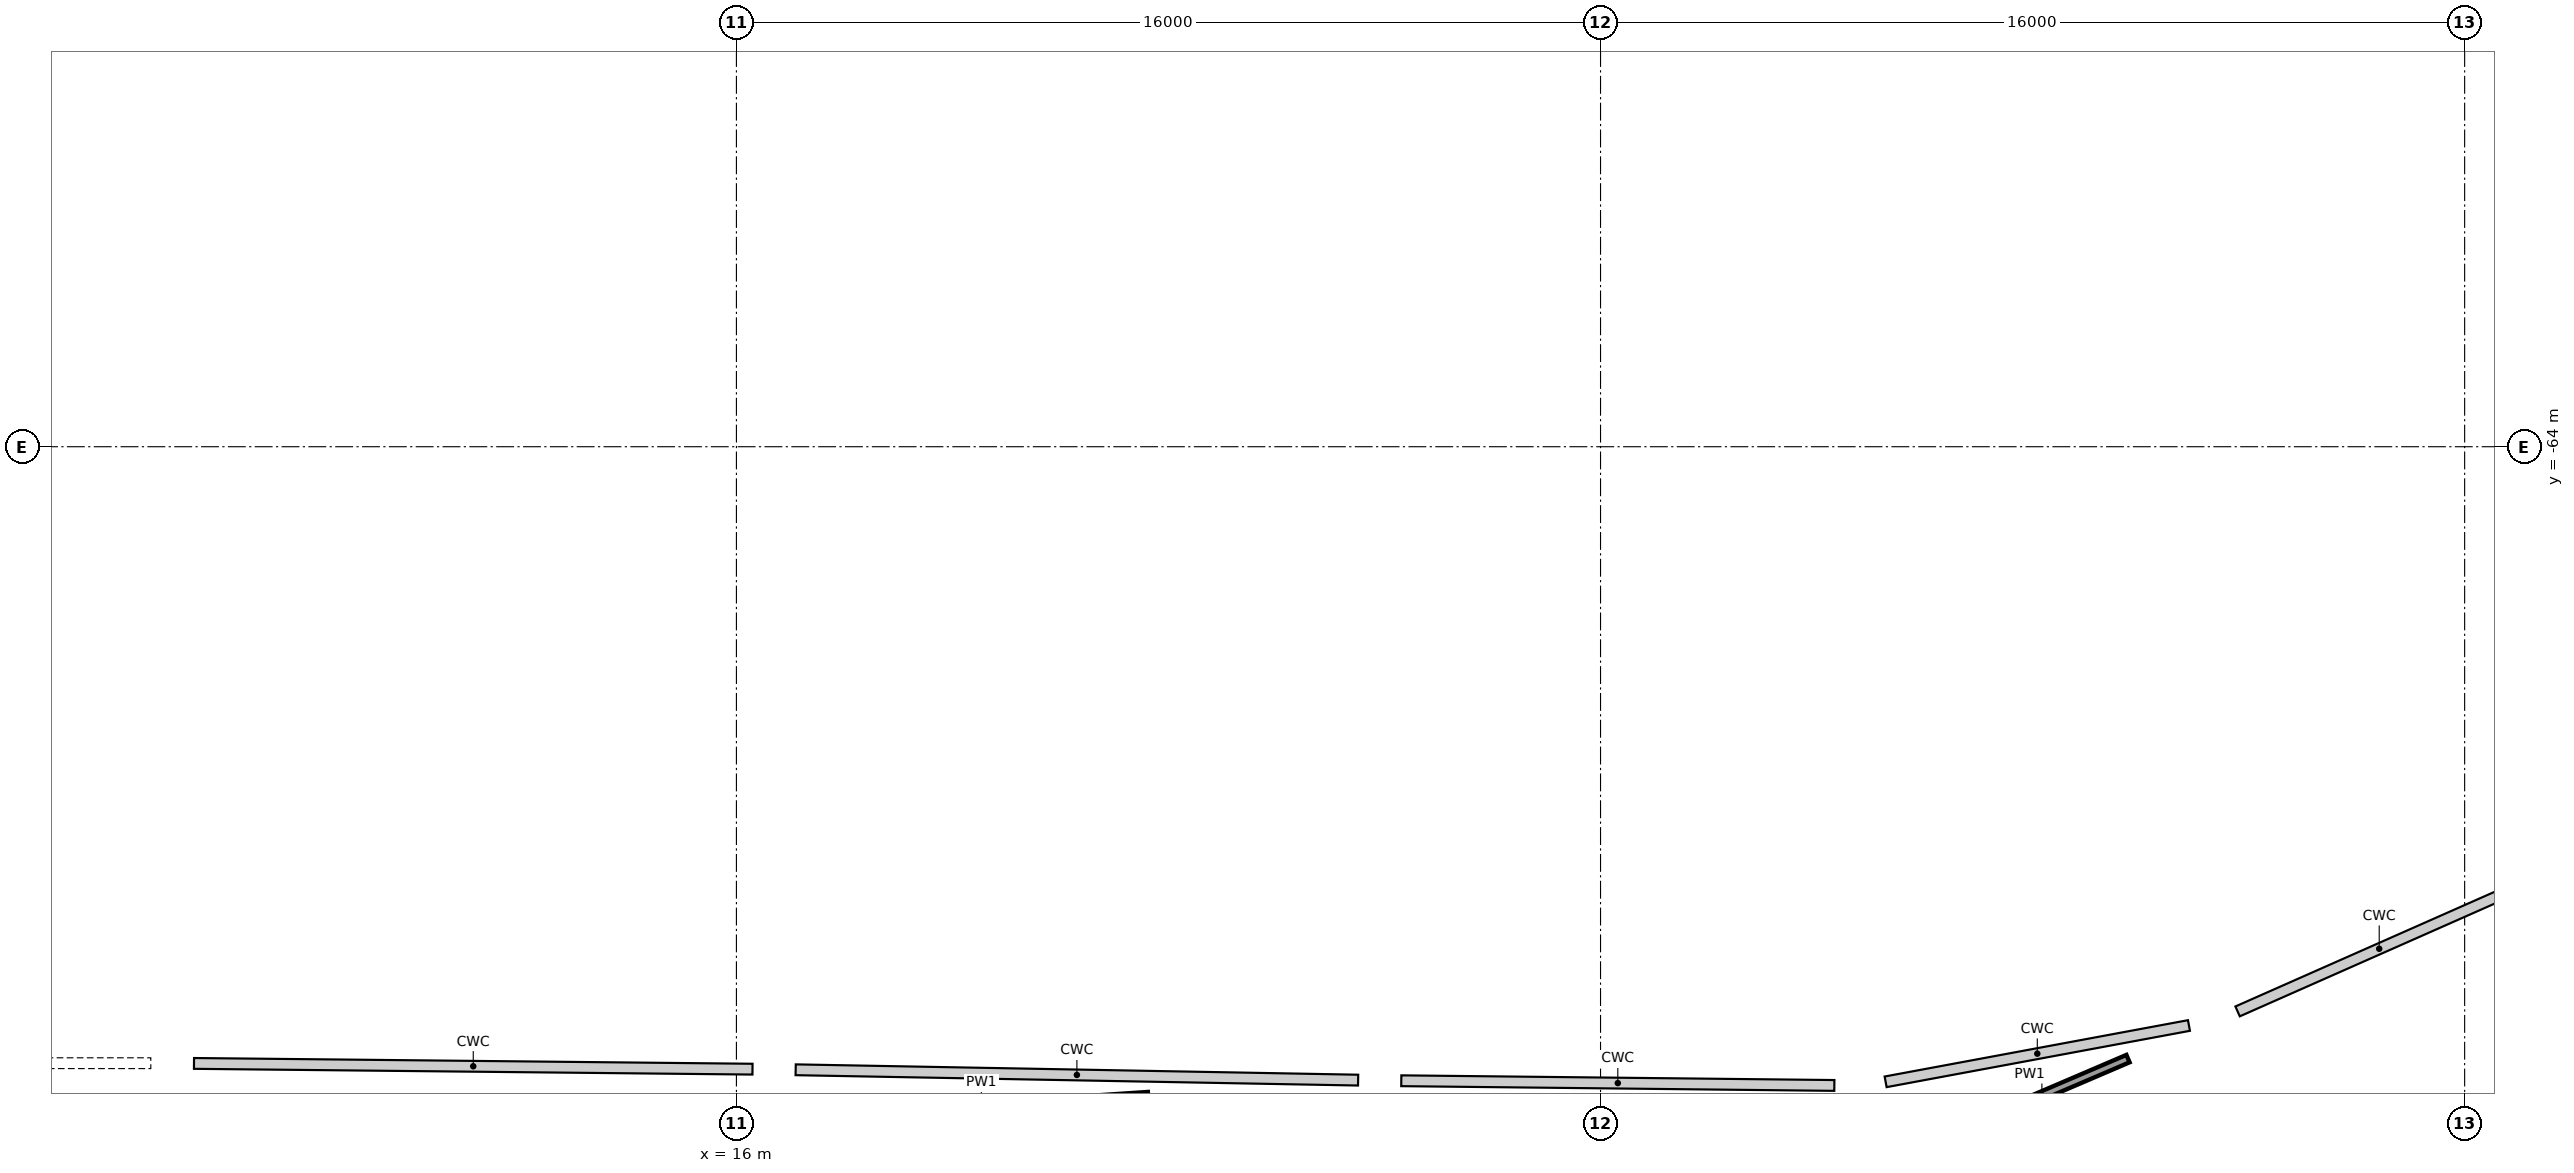
"""IFC4 building model, lengths in metres.
Left out: names, types, materials, properties, quantities, classifications, styles, units other than length and angle.
Written with IfcOpenShell. Run it as: python <this file> out.ifc"""

import sys

from ifc_helpers import new_model, si_unit, direction, frame, frame_2d, origin, origin_2d, place, context, subcontext, project, spatial, rectangle, circle, extrude, element, save


model = new_model("IFC4")
c1 = context("Model", 3, precision=1e-05, world=origin(), true_north=direction((0.0, 1.0)))
c2 = subcontext(c1, "Body", "Model", "MODEL_VIEW")
j1 = project(units=[si_unit("LENGTHUNIT", "METRE"), si_unit("PLANEANGLEUNIT", "RADIAN")], contexts=[c1])
p1 = place(None, origin())
s1 = spatial("IfcSite", under=j1, at=p1, CompositionType="ELEMENT")
p2 = place(p1, origin())
s2 = spatial("IfcBuilding", under=s1, at=p2, CompositionType="ELEMENT")
p3 = place(p2, frame((0.0, 0.0, 6.5)))
s3 = spatial("IfcBuildingStorey", under=s2, at=p3, CompositionType="ELEMENT", Elevation=6.5)
p4 = place(p3, frame((5.192, -70.824, 0.0), z_axis=(0.0, 0.0, 1.0), x_axis=(1.0, 0.0, 0.0)))
e1 = element("IfcColumn", 1, at=p4, inside=s3, PredefinedType="COLUMN", context=c2, shape_type="SweptSolid", body=[
    extrude(circle(Radius=0.45, at=origin_2d()), origin(), (0.0, 0.0, 1.0), 5.058),
])
p5 = place(p3, frame((5.557, -75.415, 0.0), z_axis=(0.0, 0.0, 1.0), x_axis=(1.0, 0.0, 0.0)))
e2 = element("IfcColumn", 2, at=p5, inside=s3, PredefinedType="COLUMN", context=c2, shape_type="SweptSolid", body=[
    extrude(circle(Radius=0.4, at=origin_2d()), origin(), (0.0, 0.0, 1.0), 5.5),
])
p6 = place(p3, frame((15.621, -71.009, 0.0), z_axis=(0.0, 0.0, 1.0), x_axis=(1.0, 0.0, 0.0)))
e3 = element("IfcColumn", 3, at=p6, inside=s3, PredefinedType="COLUMN", context=c2, shape_type="SweptSolid", body=[
    extrude(circle(Radius=0.45, at=origin_2d()), origin(), (0.0, 0.0, 1.0), 5.626),
])
p7 = place(p3, frame((16.698, -75.53, 0.0), z_axis=(0.0, 0.0, 1.0), x_axis=(1.0, 0.0, 0.0)))
e4 = element("IfcColumn", 4, at=p7, inside=s3, PredefinedType="COLUMN", context=c2, shape_type="SweptSolid", body=[
    extrude(circle(Radius=0.4, at=origin_2d()), origin(), (0.0, 0.0, 1.0), 5.5),
])
p8 = place(p3, frame((26.038, -71.014, 0.0), z_axis=(0.0, 0.0, 1.0), x_axis=(1.0, 0.0, 0.0)))
e5 = element("IfcColumn", 5, at=p8, inside=s3, PredefinedType="COLUMN", context=c2, shape_type="SweptSolid", body=[
    extrude(circle(Radius=0.45, at=origin_2d()), origin(), (0.0, 0.0, 1.0), 5.936),
])
p9 = place(p3, frame((27.911, -75.736, 0.0), z_axis=(0.0, 0.0, 1.0), x_axis=(1.0, 0.0, 0.0)))
e6 = element("IfcColumn", 6, at=p9, inside=s3, PredefinedType="COLUMN", context=c2, shape_type="SweptSolid", body=[
    extrude(circle(Radius=0.4, at=origin_2d()), origin(), (0.0, 0.0, 1.0), 5.5),
])
p10 = place(p3, frame((34.761, -72.156, 0.0), z_axis=(0.0, 0.0, 1.0), x_axis=(1.0, 0.0, 0.0)))
e7 = element("IfcColumn", 7, at=p10, inside=s3, PredefinedType="COLUMN", context=c2, shape_type="SweptSolid", body=[
    extrude(circle(Radius=0.45, at=origin_2d()), origin(), (0.0, 0.0, 1.0), 5.5),
])
p11 = place(p3, frame((36.886, -75.833, 0.0), z_axis=(0.0, 0.0, 1.0), x_axis=(1.0, 0.0, 0.0)))
e8 = element("IfcColumn", 8, at=p11, inside=s3, PredefinedType="COLUMN", context=c2, shape_type="SweptSolid", body=[
    extrude(circle(Radius=0.4, at=origin_2d()), origin(), (0.0, 0.0, 1.0), 5.5),
])
p12 = place(p3, frame((40.308, -70.748, 0.0), z_axis=(0.0, 0.0, 1.0), x_axis=(1.0, 0.0, 0.0)))
e9 = element("IfcColumn", 9, at=p12, inside=s3, PredefinedType="COLUMN", context=c2, shape_type="SweptSolid", body=[
    extrude(circle(Radius=0.45, at=origin_2d()), origin(), (0.0, 0.0, 1.0), 5.868),
])
p13 = place(p3, frame((43.43, -74.617, 0.0), z_axis=(0.0, 0.0, 1.0), x_axis=(1.0, 0.0, 0.0)))
e10 = element("IfcColumn", 10, at=p13, inside=s3, PredefinedType="COLUMN", context=c2, shape_type="SweptSolid", body=[
    extrude(circle(Radius=0.4, at=origin_2d()), origin(), (0.0, 0.0, 1.0), 5.5),
])
p14 = place(p3, frame((44.39, -75.806, 0.0), z_axis=(0.0, 0.0, 1.0), x_axis=(1.0, 0.0, 0.0)))
e11 = element("IfcColumn", 11, at=p14, inside=s3, PredefinedType="COLUMN", context=c2, shape_type="SweptSolid", body=[
    extrude(circle(Radius=0.35, at=origin_2d()), origin(), (0.0, 0.0, 1.0), 5.5),
])
p15 = place(p3, frame((45.777, -68.5, 0.0), z_axis=(0.0, 0.0, 1.0), x_axis=(1.0, 0.0, 0.0)))
e12 = element("IfcColumn", 12, at=p15, inside=s3, PredefinedType="COLUMN", context=c2, shape_type="SweptSolid", body=[
    extrude(circle(Radius=0.45, at=origin_2d()), origin(), (0.0, 0.0, 1.0), 5.72),
])
p16 = place(p3, frame((17.447, -76.434, 0.0), z_axis=(0.0, 0.0, 1.0), x_axis=(0.997781666394, 0.066571361774, 0.0)))
e13 = element("IfcWall", 13, at=p16, inside=s3, PredefinedType="PARTITIONING", context=c2, shape_type="SweptSolid", body=[
    extrude(rectangle(XDim=6.19, YDim=0.15, at=frame_2d((3.095, 0.0))), origin(), (0.0, 0.0, 1.0), 5.15),
])
p17 = place(p3, frame((38.578, -76.695, 0.0), z_axis=(0.0, 0.0, 1.0), x_axis=(0.919265141215, 0.393638921026, 0.0)))
e14 = element("IfcWall", 14, at=p17, inside=s3, PredefinedType="PARTITIONING", context=c2, shape_type="SweptSolid", body=[
    extrude(rectangle(XDim=3.468, YDim=0.15, at=frame_2d((1.734, 0.0))), origin(), (0.0, 0.0, 1.0), 5.15),
])
save(model, sys.argv[1])
